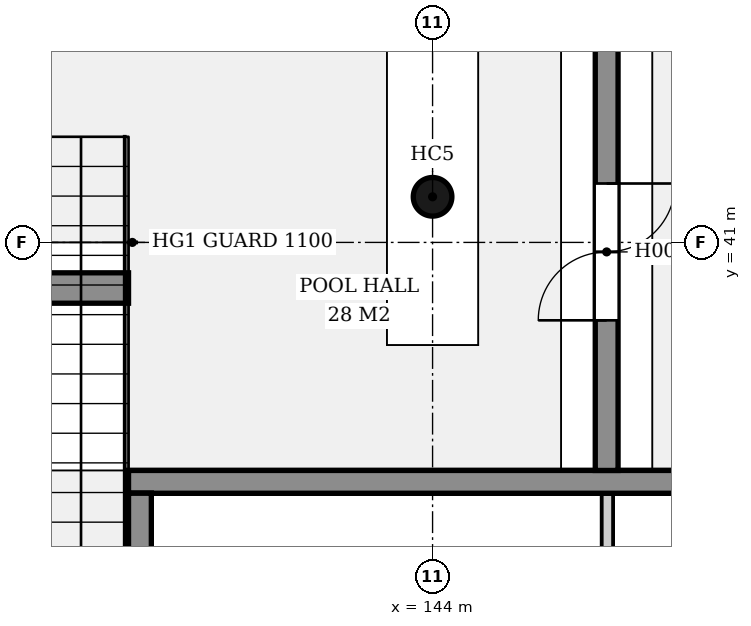
"""IFC4 building model, lengths in metres.
Left out: names, types, materials, properties, quantities, classifications, styles, units other than length and angle.
Written with IfcOpenShell. Run it as: python <this file> out.ifc"""

import sys

from ifc_helpers import new_model, si_unit, direction, frame, frame_2d, origin, origin_2d, place, context, subcontext, project, spatial, rectangle, hollow_circle, extrude, element, fill, save


model = new_model("IFC4")
c1 = context("Model", 3, precision=1e-05, world=origin(), true_north=direction((0.0, 1.0)))
c2 = subcontext(c1, "Body", "Model", "MODEL_VIEW")
j1 = project(units=[si_unit("LENGTHUNIT", "METRE"), si_unit("PLANEANGLEUNIT", "RADIAN")], contexts=[c1])
p1 = place(None, origin())
s1 = spatial("IfcSite", under=j1, at=p1, CompositionType="ELEMENT")
p2 = place(p1, origin())
s2 = spatial("IfcBuilding", under=s1, at=p2, CompositionType="ELEMENT")
p3 = place(p2, origin())
s3 = spatial("IfcBuildingStorey", under=s2, at=p3, CompositionType="ELEMENT", Elevation=0.0)
p4 = place(p3, frame((146.29, 38.0, 0.0), z_axis=(0.0, 0.0, 1.0), x_axis=(0.0, 1.0, 0.0)))
e1 = element("IfcWall", 1, at=p4, inside=s3, PredefinedType="SOLIDWALL", context=c2, shape_type="SweptSolid", body=[
    extrude(rectangle(XDim=46.0, YDim=0.3, at=frame_2d((23.0, 0.0))), origin(), (0.0, 0.0, 1.0), 5.0),
])
p5 = place(p4, frame((1.975, 0.0, 0.0)))
e2 = element("IfcOpeningElement", 2, at=p5, cuts=e1, PredefinedType="OPENING", context=c2, shape_type="SweptSolid", body=[
    extrude(rectangle(XDim=1.8, YDim=2.1, at=frame_2d((0.9, 1.05))), frame((0.0, 0.16, 0.0), z_axis=(0.0, -1.0, 0.0), x_axis=(1.0, 0.0, 0.0)), (0.0, 0.0, 1.0), 0.32),
])
p6 = place(p4, frame((7.725, 0.0, 0.0)))
e3 = element("IfcOpeningElement", 3, at=p6, cuts=e1, PredefinedType="OPENING", context=c2, shape_type="SweptSolid", body=[
    extrude(rectangle(XDim=1.8, YDim=2.1, at=frame_2d((0.9, 1.05))), frame((0.0, 0.16, 0.0), z_axis=(0.0, -1.0, 0.0), x_axis=(1.0, 0.0, 0.0)), (0.0, 0.0, 1.0), 0.32),
])
p7 = place(p4, frame((13.475, 0.0, 0.0)))
e4 = element("IfcOpeningElement", 4, at=p7, cuts=e1, PredefinedType="OPENING", context=c2, shape_type="SweptSolid", body=[
    extrude(rectangle(XDim=1.8, YDim=2.1, at=frame_2d((0.9, 1.05))), frame((0.0, 0.16, 0.0), z_axis=(0.0, -1.0, 0.0), x_axis=(1.0, 0.0, 0.0)), (0.0, 0.0, 1.0), 0.32),
])
p8 = place(p4, frame((19.225, 0.0, 0.0)))
e5 = element("IfcOpeningElement", 5, at=p8, cuts=e1, PredefinedType="OPENING", context=c2, shape_type="SweptSolid", body=[
    extrude(rectangle(XDim=1.8, YDim=2.1, at=frame_2d((0.9, 1.05))), frame((0.0, 0.16, 0.0), z_axis=(0.0, -1.0, 0.0), x_axis=(1.0, 0.0, 0.0)), (0.0, 0.0, 1.0), 0.32),
])
p9 = place(p4, frame((24.975, 0.0, 0.0)))
e6 = element("IfcOpeningElement", 6, at=p9, cuts=e1, PredefinedType="OPENING", context=c2, shape_type="SweptSolid", body=[
    extrude(rectangle(XDim=1.8, YDim=2.1, at=frame_2d((0.9, 1.05))), frame((0.0, 0.16, 0.0), z_axis=(0.0, -1.0, 0.0), x_axis=(1.0, 0.0, 0.0)), (0.0, 0.0, 1.0), 0.32),
])
p10 = place(p4, frame((30.725, 0.0, 0.0)))
e7 = element("IfcOpeningElement", 7, at=p10, cuts=e1, PredefinedType="OPENING", context=c2, shape_type="SweptSolid", body=[
    extrude(rectangle(XDim=1.8, YDim=2.1, at=frame_2d((0.9, 1.05))), frame((0.0, 0.16, 0.0), z_axis=(0.0, -1.0, 0.0), x_axis=(1.0, 0.0, 0.0)), (0.0, 0.0, 1.0), 0.32),
])
p11 = place(p4, frame((36.475, 0.0, 0.0)))
e8 = element("IfcOpeningElement", 8, at=p11, cuts=e1, PredefinedType="OPENING", context=c2, shape_type="SweptSolid", body=[
    extrude(rectangle(XDim=1.8, YDim=2.1, at=frame_2d((0.9, 1.05))), frame((0.0, 0.16, 0.0), z_axis=(0.0, -1.0, 0.0), x_axis=(1.0, 0.0, 0.0)), (0.0, 0.0, 1.0), 0.32),
])
p12 = place(p4, frame((42.225, 0.0, 0.0)))
e9 = element("IfcOpeningElement", 9, at=p12, cuts=e1, PredefinedType="OPENING", context=c2, shape_type="SweptSolid", body=[
    extrude(rectangle(XDim=1.8, YDim=2.1, at=frame_2d((0.9, 1.05))), frame((0.0, 0.16, 0.0), z_axis=(0.0, -1.0, 0.0), x_axis=(1.0, 0.0, 0.0)), (0.0, 0.0, 1.0), 0.32),
])
p13 = place(p3, frame((64.0, 40.4, -0.8), z_axis=(0.0, 0.0, 1.0), x_axis=(1.0, 0.0, 0.0)))
e10 = element("IfcWall", 10, at=p13, inside=s3, PredefinedType="SOLIDWALL", context=c2, shape_type="SweptSolid", body=[
    extrude(rectangle(XDim=76.0, YDim=0.4, at=frame_2d((38.0, 0.0))), origin(), (0.0, 0.0, 1.0), 1.66),
])
p14 = place(p3, frame((140.15, 26.45, -1.6), z_axis=(0.0, 0.0, 1.0), x_axis=(0.0, 1.0, 0.0)))
e11 = element("IfcWall", 11, at=p14, inside=s3, PredefinedType="SOLIDWALL", context=c2, shape_type="SweptSolid", body=[
    extrude(rectangle(XDim=11.25, YDim=0.3, at=frame_2d((5.625, 0.0))), origin(), (0.0, 0.0, 1.0), 1.35),
])
p15 = place(p3, frame((140.15, 26.45, 0.0), z_axis=(0.0, 0.0, 1.0), x_axis=(0.0, 1.0, 0.0)))
e12 = element("IfcWall", 12, at=p15, inside=s3, PredefinedType="SOLIDWALL", context=c2, shape_type="SweptSolid", body=[
    extrude(rectangle(XDim=11.25, YDim=0.3, at=frame_2d((5.625, 0.0))), origin(), (0.0, 0.0, 1.0), 5.0),
])
p16 = place(p15, frame((3.37, 0.0, 0.0)))
e13 = element("IfcOpeningElement", 13, at=p16, cuts=e12, PredefinedType="OPENING", context=c2, shape_type="SweptSolid", body=[
    extrude(rectangle(XDim=1.6, YDim=2.1, at=frame_2d((0.8, 1.05))), frame((0.0, 0.16, 0.0), z_axis=(0.0, -1.0, 0.0), x_axis=(1.0, 0.0, 0.0)), (0.0, 0.0, 1.0), 0.32),
])
p17 = place(p3, frame((151.55, 37.85, -1.6), z_axis=(0.0, 0.0, 1.0), x_axis=(-1.0, 0.0, 0.0)))
e14 = element("IfcWall", 14, at=p17, inside=s3, PredefinedType="SOLIDWALL", context=c2, shape_type="SweptSolid", body=[
    extrude(rectangle(XDim=11.55, YDim=0.3, at=frame_2d((5.775, 0.0))), origin(), (0.0, 0.0, 1.0), 1.35),
])
p18 = place(p3, frame((151.55, 37.85, 0.0), z_axis=(0.0, 0.0, 1.0), x_axis=(-1.0, 0.0, 0.0)))
e15 = element("IfcWall", 15, at=p18, inside=s3, PredefinedType="SOLIDWALL", context=c2, shape_type="SweptSolid", body=[
    extrude(rectangle(XDim=11.55, YDim=0.3, at=frame_2d((5.775, 0.0))), origin(), (0.0, 0.0, 1.0), 5.0),
])
p19 = place(p18, frame((0.85, 0.0, 0.0)))
e16 = element("IfcOpeningElement", 16, at=p19, cuts=e15, PredefinedType="OPENING", context=c2, shape_type="SweptSolid", body=[
    extrude(rectangle(XDim=1.6, YDim=2.1, at=frame_2d((0.8, 1.05))), frame((0.0, 0.16, 0.0), z_axis=(0.0, -1.0, 0.0), x_axis=(1.0, 0.0, 0.0)), (0.0, 0.0, 1.0), 0.32),
])
p20 = place(p3, frame((144.0, 41.6, 0.0), z_axis=(0.0, 0.0, 1.0), x_axis=(1.0, 0.0, 0.0)))
e17 = element("IfcColumn", 17, at=p20, inside=s3, PredefinedType="COLUMN", context=c2, shape_type="SweptSolid", body=[
    extrude(hollow_circle(Radius=0.254, WallThickness=0.016, at=origin_2d()), origin(), (0.0, 0.0, 1.0), 5.0),
])
p21 = place(p3, frame((146.3, 35.725, 0.0), z_axis=(0.0, 0.0, 1.0), x_axis=(0.0, 1.0, 0.0)))
e18 = element("IfcWall", 18, at=p21, inside=s3, PredefinedType="PARTITIONING", context=c2, shape_type="SweptSolid", body=[
    extrude(rectangle(XDim=1.975, YDim=0.15, at=frame_2d((0.987, 0.0))), origin(), (0.0, 0.0, 1.0), 4.75),
])
p22 = place(p5, origin())
e19 = element("IfcDoor", 19, at=p22, inside=s3, OperationType="DOUBLE_DOOR_SINGLE_SWING", PredefinedType="DOOR", context=c2, shape_type="SweptSolid", body=[
    extrude(rectangle(XDim=1.8, YDim=2.1, at=frame_2d((0.9, 1.05))), frame((0.0, 0.025, 0.0), z_axis=(0.0, -1.0, 0.0), x_axis=(1.0, 0.0, 0.0)), (0.0, 0.0, 1.0), 0.05),
])
fill(e2, e19)
save(model, sys.argv[1])
